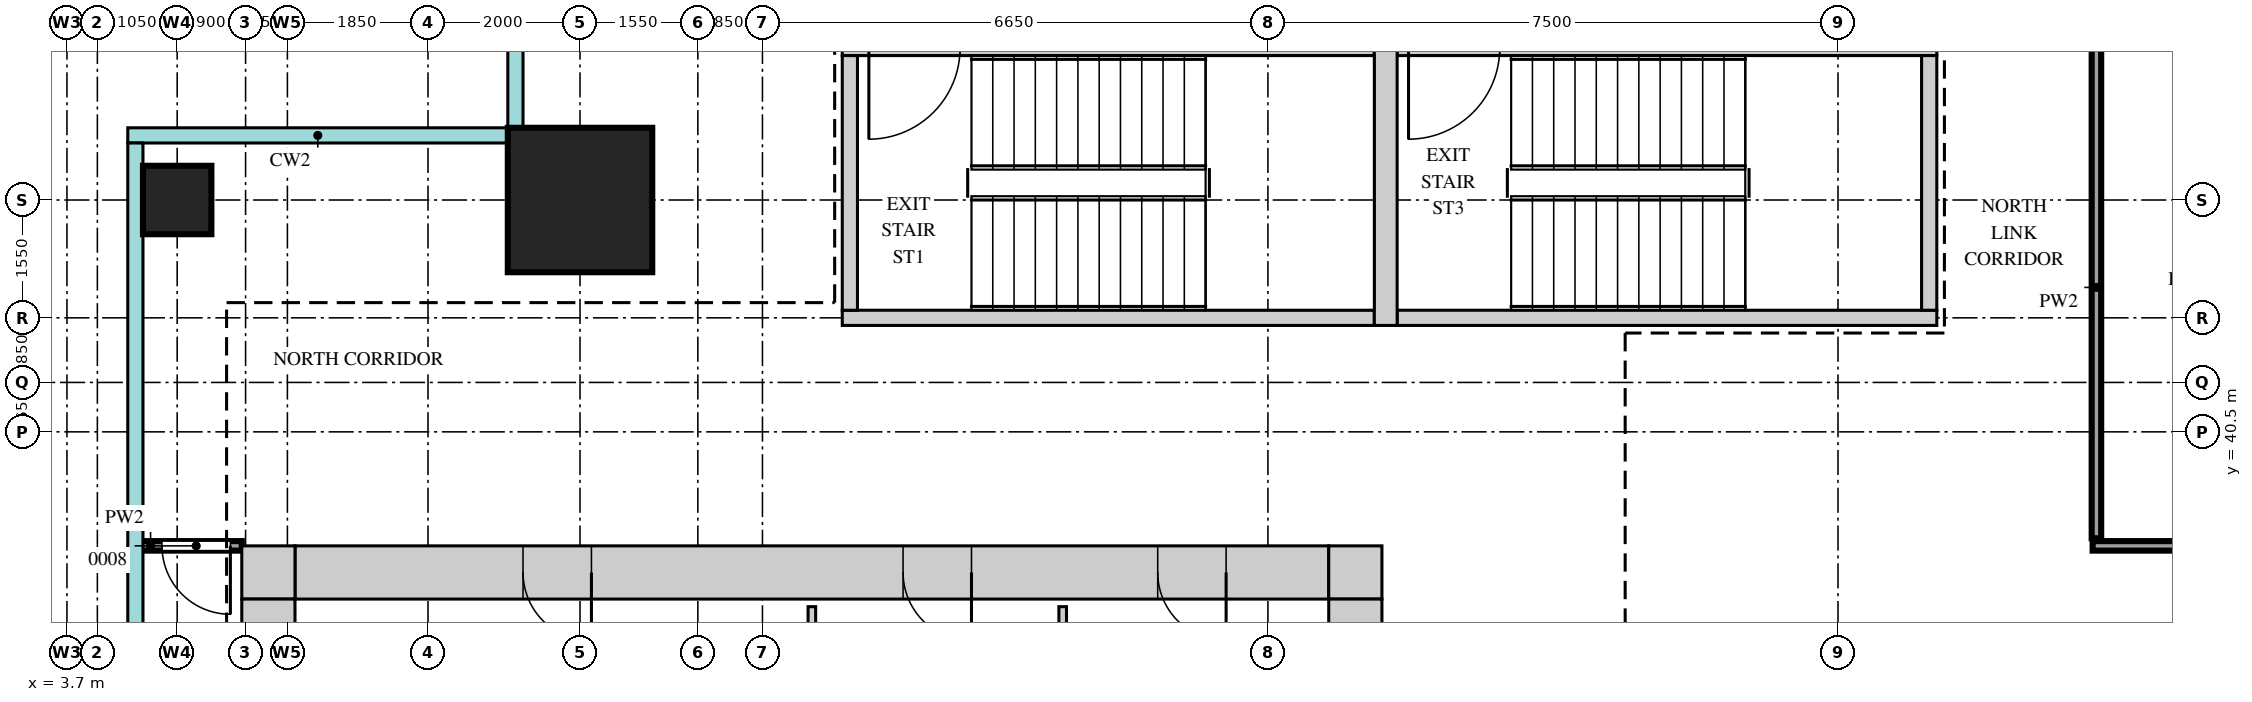
"""IFC4 building model, lengths in metres.
Left out: names, types, materials, properties, quantities, classifications, styles, units other than length and angle.
Written with IfcOpenShell. Run it as: python <this file> out.ifc"""

import sys

from ifc_helpers import new_model, si_unit, direction, frame, frame_2d, origin, origin_2d, place, context, subcontext, project, spatial, rectangle, extrude, source, transform, mapped, element, fill, save


model = new_model("IFC4")
c1 = context("Model", 3, precision=1e-05, world=origin(), true_north=direction((0.0, 1.0)))
c2 = subcontext(c1, "Body", "Model", "MODEL_VIEW")
j1 = project(units=[si_unit("LENGTHUNIT", "METRE"), si_unit("PLANEANGLEUNIT", "RADIAN")], contexts=[c1])
p1 = place(None, origin())
s1 = spatial("IfcSite", under=j1, at=p1, CompositionType="ELEMENT")
p2 = place(p1, origin())
s2 = spatial("IfcBuilding", under=s1, at=p2, CompositionType="ELEMENT")
p3 = place(p2, frame((0.0, 0.0, 270.2)))
s3 = spatial("IfcBuildingStorey", under=s2, at=p3, CompositionType="ELEMENT", Elevation=270.2)
m1 = source(origin(), c2, "Body", "SweptSolid", [
    extrude(rectangle(XDim=13.6, YDim=0.7, at=frame_2d((6.8, 0.0))), origin(), (0.0, 0.0, 1.0), 3.75),
])
p4 = place(p3, frame((6.7, 38.65, 0.0), z_axis=(0.0, 0.0, 1.0), x_axis=(1.0, 0.0, 0.0)))
e1 = element("IfcWall", 1, at=p4, inside=s3, PredefinedType="SHEAR", context=c2, shape_type="MappedRepresentation", body=[
    mapped(m1, transform((0.0, 0.0, 0.0))),
])
m2 = source(origin(), c2, "Body", "SweptSolid", [
    extrude(rectangle(XDim=0.9, YDim=2.1, at=frame_2d((0.45, 1.05))), frame((0.0, 0.36, 0.0), z_axis=(0.0, -1.0, 0.0), x_axis=(1.0, 0.0, 0.0)), (0.0, 0.0, 1.0), 0.72),
])
p5 = place(p4, frame((3.0, 0.0, 0.0)))
e2 = element("IfcOpeningElement", 2, at=p5, cuts=e1, PredefinedType="OPENING", context=c2, shape_type="MappedRepresentation", body=[
    mapped(m2, transform((0.0, 0.0, 0.0))),
])
p6 = place(p4, frame((8.0, 0.0, 0.0)))
e3 = element("IfcOpeningElement", 3, at=p6, cuts=e1, PredefinedType="OPENING", context=c2, shape_type="MappedRepresentation", body=[
    mapped(m2, transform((0.0, 0.0, 0.0))),
])
p7 = place(p4, frame((11.35, 0.0, 0.0)))
e4 = element("IfcOpeningElement", 4, at=p7, cuts=e1, PredefinedType="OPENING", context=c2, shape_type="MappedRepresentation", body=[
    mapped(m2, transform((0.0, 0.0, 0.0))),
])
m3 = source(origin(), c2, "Body", "SweptSolid", [
    extrude(rectangle(XDim=0.7, YDim=0.7, at=frame_2d((0.35, 0.0))), origin(), (0.0, 0.0, 1.0), 3.75),
])
for number, where, z_axis, x_axis in (
    (5, (20.3, 38.65, 0.0), (0.0, 0.0, 1.0), (1.0, 0.0, 0.0)),
    (6, (6.0, 38.65, 0.0), (0.0, 0.0, 1.0), (1.0, 0.0, 0.0)),
):
    element("IfcWall", number, at=place(p3, frame(where, z_axis=z_axis, x_axis=x_axis)), inside=s3, PredefinedType="SHEAR", context=c2, shape_type="MappedRepresentation", body=[
        mapped(m3, transform((0.0, 0.0, 0.0))),
    ])
m4 = source(origin(), c2, "Body", "SweptSolid", [
    extrude(rectangle(XDim=22.6, YDim=0.7, at=frame_2d((11.3, 0.0))), origin(), (0.0, 0.0, 1.0), 3.75),
])
p8 = place(p3, frame((20.65, 15.7, 0.0), z_axis=(0.0, 0.0, 1.0), x_axis=(0.0, 1.0, 0.0)))
e7 = element("IfcWall", 7, at=p8, inside=s3, PredefinedType="SHEAR", context=c2, shape_type="MappedRepresentation", body=[
    mapped(m4, transform((0.0, 0.0, 0.0))),
])
m5 = source(origin(), c2, "Body", "SweptSolid", [
    extrude(rectangle(XDim=1.8, YDim=2.1, at=frame_2d((0.9, 1.05))), frame((0.0, 0.36, 0.0), z_axis=(0.0, -1.0, 0.0), x_axis=(1.0, 0.0, 0.0)), (0.0, 0.0, 1.0), 0.72),
])
p9 = place(p8, frame((10.8, 0.0, 0.0)))
e8 = element("IfcOpeningElement", 8, at=p9, cuts=e7, PredefinedType="OPENING", context=c2, shape_type="MappedRepresentation", body=[
    mapped(m5, transform((0.0, 0.0, 0.0))),
])
p10 = place(p8, frame((0.45, 0.0, 0.0)))
e9 = element("IfcOpeningElement", 9, at=p10, cuts=e7, PredefinedType="OPENING", context=c2, shape_type="MappedRepresentation", body=[
    mapped(m2, transform((0.0, 0.0, 0.0))),
])
p11 = place(p8, frame((4.0, 0.0, 0.0)))
e10 = element("IfcOpeningElement", 10, at=p11, cuts=e7, PredefinedType="OPENING", context=c2, shape_type="MappedRepresentation", body=[
    mapped(m2, transform((0.0, 0.0, 0.0))),
])
p12 = place(p3, frame((6.35, 15.7, 0.0), z_axis=(0.0, 0.0, 1.0), x_axis=(0.0, 1.0, 0.0)))
e11 = element("IfcWall", 11, at=p12, inside=s3, PredefinedType="SHEAR", context=c2, shape_type="MappedRepresentation", body=[
    mapped(m4, transform((0.0, 0.0, 0.0))),
])
m6 = source(origin(), c2, "Body", "SweptSolid", [
    extrude(rectangle(XDim=7.0, YDim=0.2, at=frame_2d((3.5, 0.0))), origin(), (0.0, 0.0, 1.0), 3.75),
])
p13 = place(p3, frame((13.9, 45.55, 0.0), z_axis=(0.0, 0.0, 1.0), x_axis=(1.0, 0.0, 0.0)))
e12 = element("IfcWall", 12, at=p13, inside=s3, PredefinedType="SHEAR", context=c2, shape_type="MappedRepresentation", body=[
    mapped(m6, transform((0.0, 0.0, 0.0))),
])
m7 = source(origin(), c2, "Body", "SweptSolid", [
    extrude(rectangle(XDim=1.2, YDim=2.1, at=frame_2d((0.6, 1.05))), frame((0.0, 0.11, 0.0), z_axis=(0.0, -1.0, 0.0), x_axis=(1.0, 0.0, 0.0)), (0.0, 0.0, 1.0), 0.22),
])
p14 = place(p13, frame((0.35, 0.0, 0.0)))
e13 = element("IfcOpeningElement", 13, at=p14, cuts=e12, PredefinedType="OPENING", context=c2, shape_type="MappedRepresentation", body=[
    mapped(m7, transform((0.0, 0.0, 0.0))),
])
p15 = place(p3, frame((13.9, 42.0, 0.0), z_axis=(0.0, 0.0, 1.0), x_axis=(1.0, 0.0, 0.0)))
e14 = element("IfcWall", 14, at=p15, inside=s3, PredefinedType="SHEAR", context=c2, shape_type="MappedRepresentation", body=[
    mapped(m6, transform((0.0, 0.0, 0.0))),
])
m8 = source(origin(), c2, "Body", "SweptSolid", [
    extrude(rectangle(XDim=7.1, YDim=0.2, at=frame_2d((3.55, 0.0))), origin(), (0.0, 0.0, 1.0), 3.75),
])
p16 = place(p3, frame((21.2, 45.55, 0.0), z_axis=(0.0, 0.0, 1.0), x_axis=(1.0, 0.0, 0.0)))
e15 = element("IfcWall", 15, at=p16, inside=s3, PredefinedType="SHEAR", context=c2, shape_type="MappedRepresentation", body=[
    mapped(m8, transform((0.0, 0.0, 0.0))),
])
p17 = place(p16, frame((0.15, 0.0, 0.0)))
e16 = element("IfcOpeningElement", 16, at=p17, cuts=e15, PredefinedType="OPENING", context=c2, shape_type="MappedRepresentation", body=[
    mapped(m7, transform((0.0, 0.0, 0.0))),
])
p18 = place(p3, frame((21.2, 42.0, 0.0), z_axis=(0.0, 0.0, 1.0), x_axis=(1.0, 0.0, 0.0)))
e17 = element("IfcWall", 17, at=p18, inside=s3, PredefinedType="SHEAR", context=c2, shape_type="MappedRepresentation", body=[
    mapped(m8, transform((0.0, 0.0, 0.0))),
])
m9 = source(origin(), c2, "Body", "SweptSolid", [
    extrude(rectangle(XDim=3.75, YDim=0.3, at=frame_2d((1.875, 0.0))), origin(), (0.0, 0.0, 1.0), 3.75),
])
p19 = place(p3, frame((21.05, 41.9, 0.0), z_axis=(0.0, 0.0, 1.0), x_axis=(0.0, 1.0, 0.0)))
e18 = element("IfcWall", 18, at=p19, inside=s3, PredefinedType="SHEAR", context=c2, shape_type="MappedRepresentation", body=[
    mapped(m9, transform((0.0, 0.0, 0.0))),
])
m10 = source(origin(), c2, "Body", "SweptSolid", [
    extrude(rectangle(XDim=3.35, YDim=0.2, at=frame_2d((1.675, 0.0))), origin(), (0.0, 0.0, 1.0), 3.75),
])
for number, where, z_axis, x_axis in (
    (19, (14.0, 42.1, 0.0), (0.0, 0.0, 1.0), (0.0, 1.0, 0.0)),
    (20, (28.2, 42.1, 0.0), (0.0, 0.0, 1.0), (0.0, 1.0, 0.0)),
):
    element("IfcWall", number, at=place(p3, frame(where, z_axis=z_axis, x_axis=x_axis)), inside=s3, PredefinedType="SHEAR", context=c2, shape_type="MappedRepresentation", body=[
        mapped(m10, transform((0.0, 0.0, 0.0))),
    ])
m11 = source(origin(), c2, "Body", "SweptSolid", [
    extrude(rectangle(XDim=1.9, YDim=1.9, at=origin_2d()), origin(), (0.0, 0.0, 1.0), 4.0),
])
p20 = place(p3, frame((10.45, 43.55, 0.0), z_axis=(0.0, 0.0, 1.0), x_axis=(1.0, 0.0, 0.0)))
e21 = element("IfcColumn", 21, at=p20, inside=s3, PredefinedType="COLUMN", context=c2, shape_type="MappedRepresentation", body=[
    mapped(m11, transform((0.0, 0.0, 0.0))),
])
m12 = source(origin(), c2, "Body", "SweptSolid", [
    extrude(rectangle(XDim=0.9, YDim=0.9, at=origin_2d()), origin(), (0.0, 0.0, 1.0), 4.0),
])
p21 = place(p3, frame((5.15, 43.55, 0.0), z_axis=(0.0, 0.0, 1.0), x_axis=(1.0, 0.0, 0.0)))
e22 = element("IfcColumn", 22, at=p21, inside=s3, PredefinedType="COLUMN", context=c2, shape_type="MappedRepresentation", body=[
    mapped(m12, transform((0.0, 0.0, 0.0))),
])
m13 = source(origin(), c2, "Body", "SweptSolid", [
    extrude(rectangle(XDim=6.0, YDim=0.1, at=frame_2d((3.0, 0.0))), origin(), (0.0, 0.0, 1.0), 3.8),
])
p22 = place(p3, frame((13.5, 32.2, 0.0), z_axis=(0.0, 0.0, 1.0), x_axis=(0.0, 1.0, 0.0)))
e23 = element("IfcWall", 23, at=p22, inside=s3, PredefinedType="PARTITIONING", context=c2, shape_type="MappedRepresentation", body=[
    mapped(m13, transform((0.0, 0.0, 0.0))),
])
m14 = source(origin(), c2, "Body", "SweptSolid", [
    extrude(rectangle(XDim=5.9, YDim=0.1, at=frame_2d((2.95, 0.0))), origin(), (0.0, 0.0, 1.0), 3.8),
])
p23 = place(p3, frame((16.8, 32.3, 0.0), z_axis=(0.0, 0.0, 1.0), x_axis=(0.0, 1.0, 0.0)))
e24 = element("IfcWall", 24, at=p23, inside=s3, PredefinedType="PARTITIONING", context=c2, shape_type="MappedRepresentation", body=[
    mapped(m14, transform((0.0, 0.0, 0.0))),
])
m15 = source(origin(), c2, "Body", "SweptSolid", [
    extrude(rectangle(XDim=1.35, YDim=0.125, at=frame_2d((0.675, 0.0))), origin(), (0.0, 0.0, 1.0), 3.8),
])
p24 = place(p3, frame((4.65, 39.0, 0.0), z_axis=(0.0, 0.0, 1.0), x_axis=(1.0, 0.0, 0.0)))
e25 = element("IfcWall", 25, at=p24, inside=s3, PredefinedType="PARTITIONING", context=c2, shape_type="MappedRepresentation", body=[
    mapped(m15, transform((0.0, 0.0, 0.0))),
])
m16 = source(origin(), c2, "Body", "SweptSolid", [
    extrude(rectangle(XDim=0.9, YDim=2.1, at=frame_2d((0.45, 1.05))), frame((0.0, 0.073, 0.0), z_axis=(0.0, -1.0, 0.0), x_axis=(1.0, 0.0, 0.0)), (0.0, 0.0, 1.0), 0.145),
])
p25 = place(p24, frame((0.3, 0.0, 0.0)))
e26 = element("IfcOpeningElement", 26, at=p25, cuts=e25, PredefinedType="OPENING", context=c2, shape_type="MappedRepresentation", body=[
    mapped(m16, transform((0.0, 0.0, 0.0))),
])
m17 = source(origin(), c2, "Body", "SweptSolid", [
    extrude(rectangle(XDim=19.0, YDim=0.125, at=frame_2d((9.5, 0.0))), origin(), (0.0, 0.0, 1.0), 3.8),
])
p26 = place(p3, frame((30.35, 39.0, 0.0), z_axis=(0.0, 0.0, 1.0), x_axis=(1.0, 0.0, 0.0)))
e27 = element("IfcWall", 27, at=p26, inside=s3, PredefinedType="PARTITIONING", context=c2, shape_type="MappedRepresentation", body=[
    mapped(m17, transform((0.0, 0.0, 0.0))),
])
p27 = place(p26, frame((1.8, 0.0, 0.0)))
e28 = element("IfcOpeningElement", 28, at=p27, cuts=e27, PredefinedType="OPENING", context=c2, shape_type="MappedRepresentation", body=[
    mapped(m16, transform((0.0, 0.0, 0.0))),
])
p28 = place(p26, frame((8.1, 0.0, 0.0)))
e29 = element("IfcOpeningElement", 29, at=p28, cuts=e27, PredefinedType="OPENING", context=c2, shape_type="MappedRepresentation", body=[
    mapped(m16, transform((0.0, 0.0, 0.0))),
])
p29 = place(p26, frame((15.6, 0.0, 0.0)))
e30 = element("IfcOpeningElement", 30, at=p29, cuts=e27, PredefinedType="OPENING", context=c2, shape_type="MappedRepresentation", body=[
    mapped(m16, transform((0.0, 0.0, 0.0))),
])
m18 = source(origin(), c2, "Body", "SweptSolid", [
    extrude(rectangle(XDim=6.6, YDim=0.125, at=frame_2d((3.3, 0.0))), origin(), (0.0, 0.0, 1.0), 3.8),
])
p30 = place(p3, frame((30.4, 39.1, 0.0), z_axis=(0.0, 0.0, 1.0), x_axis=(0.0, 1.0, 0.0)))
e31 = element("IfcWall", 31, at=p30, inside=s3, PredefinedType="PARTITIONING", context=c2, shape_type="MappedRepresentation", body=[
    mapped(m18, transform((0.0, 0.0, 0.0))),
])
m19 = source(origin(), c2, "Body", "SweptSolid", [
    extrude(rectangle(XDim=0.9, YDim=2.1, at=frame_2d((0.45, 1.05))), frame((0.0, 0.3, 0.0), z_axis=(0.0, -1.0, 0.0), x_axis=(1.0, 0.0, 0.0)), (0.0, 0.0, 1.0), 0.6),
])
p31 = place(p5, origin())
e32 = element("IfcDoor", 32, at=p31, inside=s3, OperationType="SINGLE_SWING_RIGHT", PredefinedType="DOOR", context=c2, shape_type="MappedRepresentation", body=[
    mapped(m19, transform((0.0, 0.0, 0.0))),
])
fill(e2, e32)
p32 = place(p6, origin())
e33 = element("IfcDoor", 33, at=p32, inside=s3, OperationType="SINGLE_SWING_RIGHT", PredefinedType="DOOR", context=c2, shape_type="MappedRepresentation", body=[
    mapped(m19, transform((0.0, 0.0, 0.0))),
])
fill(e3, e33)
p33 = place(p7, origin())
e34 = element("IfcDoor", 34, at=p33, inside=s3, OperationType="SINGLE_SWING_RIGHT", PredefinedType="DOOR", context=c2, shape_type="MappedRepresentation", body=[
    mapped(m19, transform((0.0, 0.0, 0.0))),
])
fill(e4, e34)
m20 = source(origin(), c2, "Body", "SweptSolid", [
    extrude(rectangle(XDim=0.9, YDim=2.1, at=frame_2d((0.45, 1.05))), frame((0.0, 0.025, 0.0), z_axis=(0.0, -1.0, 0.0), x_axis=(1.0, 0.0, 0.0)), (0.0, 0.0, 1.0), 0.05),
])
p34 = place(p25, origin())
e35 = element("IfcDoor", 35, at=p34, inside=s3, OperationType="SINGLE_SWING_RIGHT", PredefinedType="DOOR", context=c2, shape_type="MappedRepresentation", body=[
    mapped(m20, transform((0.0, 0.0, 0.0))),
])
fill(e26, e35)
save(model, sys.argv[1])
